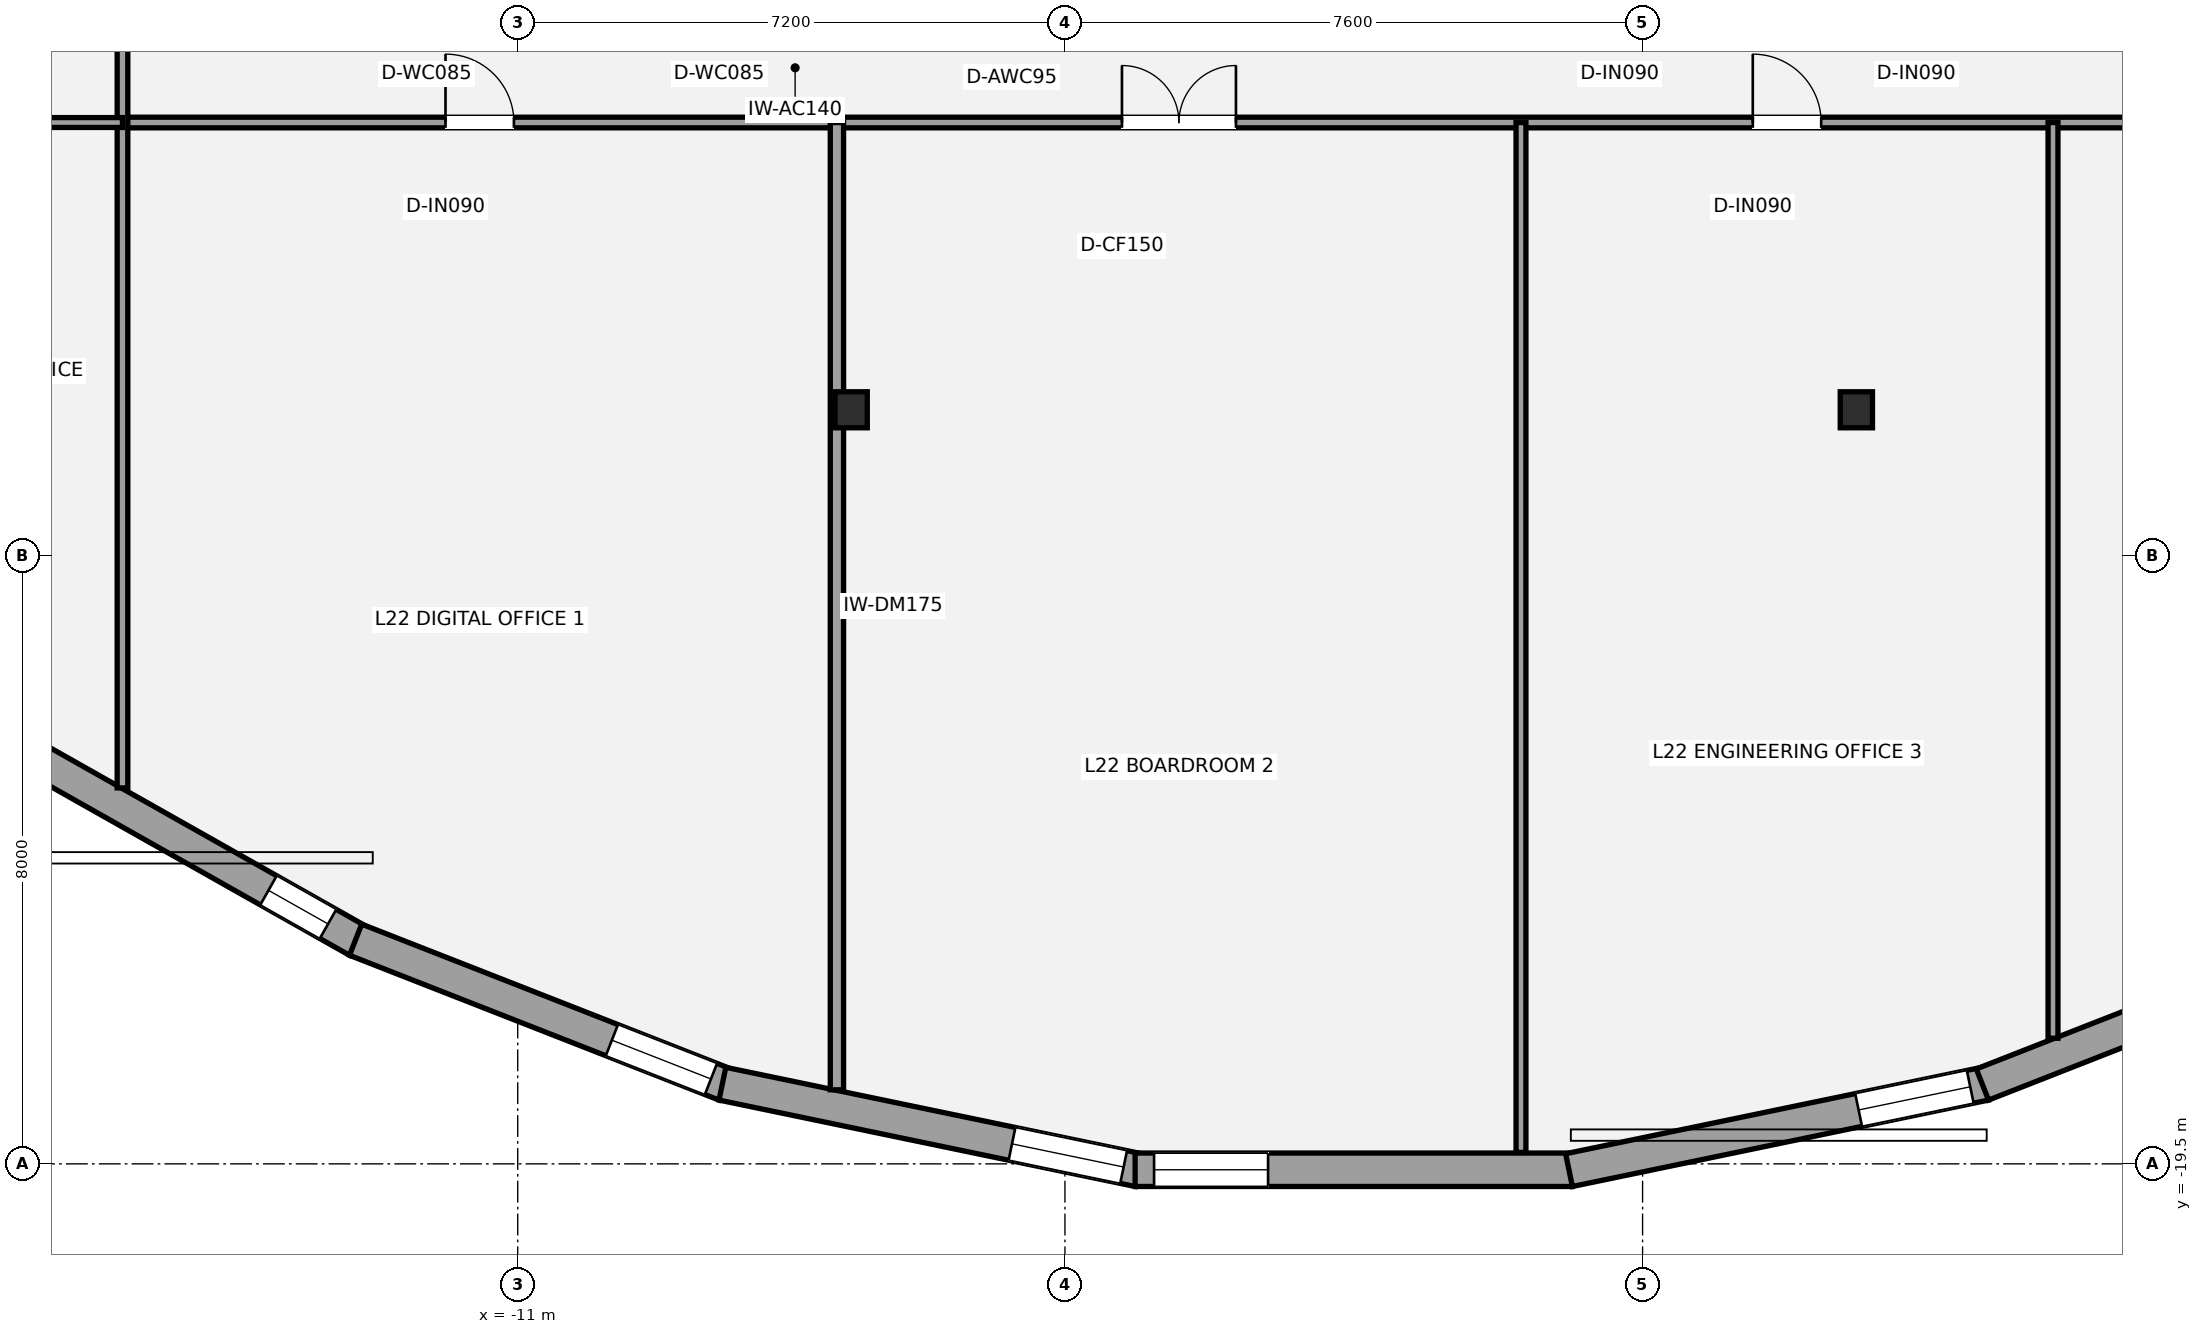
"""IFC4 building model, lengths in metres.
Left out: names, types, materials, properties, quantities, classifications, styles, units other than length and angle.
Written with IfcOpenShell. Run it as: python <this file> out.ifc"""

import sys

from ifc_helpers import new_model, si_unit, direction, frame, frame_2d, origin, origin_2d, place, context, subcontext, project, spatial, rectangle, i_section, extrude, element, fill, save


model = new_model("IFC4")
c1 = context("Model", 3, precision=1e-05, world=origin(), true_north=direction((0.0, 1.0)))
c2 = subcontext(c1, "Body", "Model", "MODEL_VIEW")
j1 = project(units=[si_unit("LENGTHUNIT", "METRE"), si_unit("PLANEANGLEUNIT", "RADIAN")], contexts=[c1])
p1 = place(None, origin())
s1 = spatial("IfcSite", under=j1, at=p1, CompositionType="ELEMENT")
p2 = place(p1, origin())
s2 = spatial("IfcBuilding", under=s1, at=p2, CompositionType="ELEMENT")
p3 = place(p2, frame((0.0, 0.0, 86.1)))
s3 = spatial("IfcBuildingStorey", under=s2, at=p3, CompositionType="ELEMENT", Elevation=86.1)
for number, where, z_axis, x_axis in (
    (1, (-6.613, -9.579, 0.0), (0.0, 0.0, 1.0), (1.0, 0.0, 0.0)),
    (2, (6.613, -9.579, 0.0), (0.0, 0.0, 1.0), (1.0, 0.0, 0.0)),
):
    element("IfcColumn", number, at=place(p3, frame(where, z_axis=z_axis, x_axis=x_axis)), inside=s3, PredefinedType="COLUMN", context=c2, shape_type="SweptSolid", body=[
        extrude(i_section(OverallWidth=0.424, OverallDepth=0.474, WebThickness=0.048, FlangeThickness=0.077, at=origin_2d()), origin(), (0.0, 0.0, 1.0), 3.5),
    ])
p4 = place(p3, frame((-13.105, -16.564, 0.0), z_axis=(0.0, 0.0, 1.0), x_axis=(-0.870732411856, 0.491757121903, 0.0)))
e3 = element("IfcWall", 3, at=p4, inside=s3, PredefinedType="STANDARD", context=c2, shape_type="SweptSolid", body=[
    extrude(rectangle(XDim=4.825, YDim=0.44, at=frame_2d((2.413, 0.0))), origin(), (0.0, 0.0, 1.0), 2.528),
])
p5 = place(p4, frame((0.448, 0.0, 0.58)))
e4 = element("IfcOpeningElement", 4, at=p5, cuts=e3, PredefinedType="OPENING", context=c2, shape_type="SweptSolid", body=[
    extrude(rectangle(XDim=0.9, YDim=1.35, at=frame_2d((0.45, 0.675))), frame((0.0, 0.23, 0.0), z_axis=(0.0, -1.0, 0.0), x_axis=(1.0, 0.0, 0.0)), (0.0, 0.0, 1.0), 0.46),
])
p6 = place(p3, frame((-8.271, -18.456, 0.0), z_axis=(0.0, 0.0, 1.0), x_axis=(-0.931059171354, 0.364868222017, 0.0)))
e5 = element("IfcWall", 5, at=p6, inside=s3, PredefinedType="STANDARD", context=c2, shape_type="SweptSolid", body=[
    extrude(rectangle(XDim=5.222, YDim=0.44, at=frame_2d((2.611, 0.0))), origin(), (0.0, 0.0, 1.0), 2.528),
])
p7 = place(p6, frame((0.2, 0.0, 0.58)))
e6 = element("IfcOpeningElement", 6, at=p7, cuts=e5, PredefinedType="OPENING", context=c2, shape_type="SweptSolid", body=[
    extrude(rectangle(XDim=1.4, YDim=1.55, at=frame_2d((0.7, 0.775))), frame((0.0, 0.23, 0.0), z_axis=(0.0, -1.0, 0.0), x_axis=(1.0, 0.0, 0.0)), (0.0, 0.0, 1.0), 0.46),
])
p8 = place(p3, frame((-2.832, -19.582, 0.0), z_axis=(0.0, 0.0, 1.0), x_axis=(-0.979118590293, 0.20328990664, 0.0)))
e7 = element("IfcWall", 7, at=p8, inside=s3, PredefinedType="STANDARD", context=c2, shape_type="SweptSolid", body=[
    extrude(rectangle(XDim=5.592, YDim=0.44, at=frame_2d((2.796, 0.0))), origin(), (0.0, 0.0, 1.0), 2.528),
])
p9 = place(p8, frame((0.2, 0.0, 0.65)))
e8 = element("IfcOpeningElement", 8, at=p9, cuts=e7, PredefinedType="OPENING", context=c2, shape_type="SweptSolid", body=[
    extrude(rectangle(XDim=1.5, YDim=1.7, at=frame_2d((0.75, 0.85))), frame((0.0, 0.23, 0.0), z_axis=(0.0, -1.0, 0.0), x_axis=(1.0, 0.0, 0.0)), (0.0, 0.0, 1.0), 0.46),
])
p10 = place(p3, frame((2.877, -19.578, 0.0), z_axis=(0.0, 0.0, 1.0), x_axis=(-1.0, 0.0, 0.0)))
e9 = element("IfcWall", 9, at=p10, inside=s3, PredefinedType="STANDARD", context=c2, shape_type="SweptSolid", body=[
    extrude(rectangle(XDim=5.753, YDim=0.44, at=frame_2d((2.877, 0.0))), origin(), (0.0, 0.0, 1.0), 2.528),
])
p11 = place(p10, frame((4.004, 0.0, 0.65)))
e10 = element("IfcOpeningElement", 10, at=p11, cuts=e9, PredefinedType="OPENING", context=c2, shape_type="SweptSolid", body=[
    extrude(rectangle(XDim=1.5, YDim=1.7, at=frame_2d((0.75, 0.85))), frame((0.0, 0.23, 0.0), z_axis=(0.0, -1.0, 0.0), x_axis=(1.0, 0.0, 0.0)), (0.0, 0.0, 1.0), 0.46),
])
p12 = place(p3, frame((8.307, -18.446, 0.0), z_axis=(0.0, 0.0, 1.0), x_axis=(-0.979118590293, -0.20328990664, 0.0)))
e11 = element("IfcWall", 11, at=p12, inside=s3, PredefinedType="STANDARD", context=c2, shape_type="SweptSolid", body=[
    extrude(rectangle(XDim=5.592, YDim=0.44, at=frame_2d((2.796, 0.0))), origin(), (0.0, 0.0, 1.0), 2.528),
])
p13 = place(p12, frame((0.2, 0.0, 0.65)))
e12 = element("IfcOpeningElement", 12, at=p13, cuts=e11, PredefinedType="OPENING", context=c2, shape_type="SweptSolid", body=[
    extrude(rectangle(XDim=1.5, YDim=1.7, at=frame_2d((0.75, 0.85))), frame((0.0, 0.23, 0.0), z_axis=(0.0, -1.0, 0.0), x_axis=(1.0, 0.0, 0.0)), (0.0, 0.0, 1.0), 0.46),
])
p14 = place(p3, frame((13.133, -16.551, 0.0), z_axis=(0.0, 0.0, 1.0), x_axis=(-0.931059171354, -0.364868222017, 0.0)))
e13 = element("IfcWall", 13, at=p14, inside=s3, PredefinedType="STANDARD", context=c2, shape_type="SweptSolid", body=[
    extrude(rectangle(XDim=5.222, YDim=0.44, at=frame_2d((2.611, 0.0))), origin(), (0.0, 0.0, 1.0), 2.528),
])
p15 = place(p14, frame((0.25, 0.0, 0.58)))
e14 = element("IfcOpeningElement", 14, at=p15, cuts=e13, PredefinedType="OPENING", context=c2, shape_type="SweptSolid", body=[
    extrude(rectangle(XDim=1.4, YDim=1.55, at=frame_2d((0.7, 0.775))), frame((0.0, 0.23, 0.0), z_axis=(0.0, -1.0, 0.0), x_axis=(1.0, 0.0, 0.0)), (0.0, 0.0, 1.0), 0.46),
])
p16 = place(p3, frame((-16.2, -5.8, 0.0), z_axis=(0.0, 0.0, 1.0), x_axis=(1.0, 0.0, 0.0)))
e15 = element("IfcWall", 15, at=p16, inside=s3, PredefinedType="PARTITIONING", context=c2, shape_type="SweptSolid", body=[
    extrude(rectangle(XDim=32.4, YDim=0.14, at=frame_2d((16.2, 0.0))), origin(), (0.0, 0.0, 1.0), 2.763),
])
p17 = place(p16, frame((4.25, 0.0, 0.0)))
e16 = element("IfcOpeningElement", 16, at=p17, cuts=e15, PredefinedType="OPENING", context=c2, shape_type="SweptSolid", body=[
    extrude(rectangle(XDim=0.9, YDim=2.1, at=frame_2d((0.45, 1.05))), frame((0.0, 0.08, 0.0), z_axis=(0.0, -1.0, 0.0), x_axis=(1.0, 0.0, 0.0)), (0.0, 0.0, 1.0), 0.16),
])
p18 = place(p16, frame((13.15, 0.0, 0.0)))
e17 = element("IfcOpeningElement", 17, at=p18, cuts=e15, PredefinedType="OPENING", context=c2, shape_type="SweptSolid", body=[
    extrude(rectangle(XDim=1.5, YDim=2.15, at=frame_2d((0.75, 1.075))), frame((0.0, 0.08, 0.0), z_axis=(0.0, -1.0, 0.0), x_axis=(1.0, 0.0, 0.0)), (0.0, 0.0, 1.0), 0.16),
])
p19 = place(p16, frame((21.45, 0.0, 0.0)))
e18 = element("IfcOpeningElement", 18, at=p19, cuts=e15, PredefinedType="OPENING", context=c2, shape_type="SweptSolid", body=[
    extrude(rectangle(XDim=0.9, YDim=2.1, at=frame_2d((0.45, 1.05))), frame((0.0, 0.08, 0.0), z_axis=(0.0, -1.0, 0.0), x_axis=(1.0, 0.0, 0.0)), (0.0, 0.0, 1.0), 0.16),
])
p20 = place(p16, frame((28.15, 0.0, 0.0)))
e19 = element("IfcOpeningElement", 19, at=p20, cuts=e15, PredefinedType="OPENING", context=c2, shape_type="SweptSolid", body=[
    extrude(rectangle(XDim=1.5, YDim=2.15, at=frame_2d((0.75, 1.075))), frame((0.0, 0.08, 0.0), z_axis=(0.0, -1.0, 0.0), x_axis=(1.0, 0.0, 0.0)), (0.0, 0.0, 1.0), 0.16),
])
p21 = place(p3, frame((-16.2, -14.554, 0.0), z_axis=(0.0, 0.0, 1.0), x_axis=(0.0, 1.0, 0.0)))
e20 = element("IfcWall", 20, at=p21, inside=s3, PredefinedType="PARTITIONING", context=c2, shape_type="SweptSolid", body=[
    extrude(rectangle(XDim=22.104, YDim=0.14, at=frame_2d((11.052, 0.0))), origin(), (0.0, 0.0, 1.0), 2.751),
])
p22 = place(p21, frame((12.204, 0.0, 0.0)))
e21 = element("IfcOpeningElement", 21, at=p22, cuts=e20, PredefinedType="OPENING", context=c2, shape_type="SweptSolid", body=[
    extrude(rectangle(XDim=0.9, YDim=2.1, at=frame_2d((0.45, 1.05))), frame((0.0, 0.08, 0.0), z_axis=(0.0, -1.0, 0.0), x_axis=(1.0, 0.0, 0.0)), (0.0, 0.0, 1.0), 0.16),
])
p23 = place(p21, frame((18.879, 0.0, 0.0)))
e22 = element("IfcOpeningElement", 22, at=p23, cuts=e20, PredefinedType="OPENING", context=c2, shape_type="SweptSolid", body=[
    extrude(rectangle(XDim=0.9, YDim=2.1, at=frame_2d((0.45, 1.05))), frame((0.0, 0.08, 0.0), z_axis=(0.0, -1.0, 0.0), x_axis=(1.0, 0.0, 0.0)), (0.0, 0.0, 1.0), 0.16),
])
p24 = place(p3, frame((-6.8, -18.526, 0.0), z_axis=(0.0, 0.0, 1.0), x_axis=(0.0, 1.0, 0.0)))
e23 = element("IfcWall", 23, at=p24, inside=s3, PredefinedType="PARTITIONING", context=c2, shape_type="SweptSolid", body=[
    extrude(rectangle(XDim=12.726, YDim=0.175, at=frame_2d((6.363, 0.0))), origin(), (0.0, 0.0, 1.0), 2.751),
])
p25 = place(p3, frame((2.2, -19.35, 0.0), z_axis=(0.0, 0.0, 1.0), x_axis=(0.0, 1.0, 0.0)))
e24 = element("IfcWall", 24, at=p25, inside=s3, PredefinedType="PARTITIONING", context=c2, shape_type="SweptSolid", body=[
    extrude(rectangle(XDim=13.55, YDim=0.13, at=frame_2d((6.775, 0.0))), origin(), (0.0, 0.0, 1.0), 2.763),
])
p26 = place(p3, frame((9.2, -17.847, 0.0), z_axis=(0.0, 0.0, 1.0), x_axis=(0.0, 1.0, 0.0)))
e25 = element("IfcWall", 25, at=p26, inside=s3, PredefinedType="PARTITIONING", context=c2, shape_type="SweptSolid", body=[
    extrude(rectangle(XDim=12.047, YDim=0.13, at=frame_2d((6.024, 0.0))), origin(), (0.0, 0.0, 1.0), 3.31),
])
p27 = place(p3, frame((-26.823, -5.8, 0.0), z_axis=(0.0, 0.0, 1.0), x_axis=(1.0, 0.0, 0.0)))
e26 = element("IfcWall", 26, at=p27, inside=s3, PredefinedType="PARTITIONING", context=c2, shape_type="SweptSolid", body=[
    extrude(rectangle(XDim=10.624, YDim=0.13, at=frame_2d((5.312, 0.0))), origin(), (0.0, 0.0, 1.0), 2.688),
])
p28 = place(p27, frame((1.23, 0.0, 0.0)))
e27 = element("IfcOpeningElement", 27, at=p28, cuts=e26, PredefinedType="OPENING", context=c2, shape_type="SweptSolid", body=[
    extrude(rectangle(XDim=0.9, YDim=2.1, at=frame_2d((0.45, 1.05))), frame((0.0, 0.075, 0.0), z_axis=(0.0, -1.0, 0.0), x_axis=(1.0, 0.0, 0.0)), (0.0, 0.0, 1.0), 0.15),
])
p29 = place(p5, origin())
e28 = element("IfcWindow", 28, at=p29, inside=s3, PartitioningType="SINGLE_PANEL", PredefinedType="WINDOW", context=c2, shape_type="SweptSolid", body=[
    extrude(rectangle(XDim=0.9, YDim=1.35, at=frame_2d((0.45, 0.675))), frame((0.0, -0.01, 0.0), z_axis=(0.0, -1.0, 0.0), x_axis=(1.0, 0.0, 0.0)), (0.0, 0.0, 1.0), 0.06),
])
fill(e4, e28)
p30 = place(p7, origin())
e29 = element("IfcWindow", 29, at=p30, inside=s3, PartitioningType="SINGLE_PANEL", PredefinedType="WINDOW", context=c2, shape_type="SweptSolid", body=[
    extrude(rectangle(XDim=1.4, YDim=1.55, at=frame_2d((0.7, 0.775))), frame((0.0, -0.01, 0.0), z_axis=(0.0, -1.0, 0.0), x_axis=(1.0, 0.0, 0.0)), (0.0, 0.0, 1.0), 0.06),
])
fill(e6, e29)
p31 = place(p9, origin())
e30 = element("IfcWindow", 30, at=p31, inside=s3, PartitioningType="SINGLE_PANEL", PredefinedType="WINDOW", context=c2, shape_type="SweptSolid", body=[
    extrude(rectangle(XDim=1.5, YDim=1.7, at=frame_2d((0.75, 0.85))), frame((0.0, -0.01, 0.0), z_axis=(0.0, -1.0, 0.0), x_axis=(1.0, 0.0, 0.0)), (0.0, 0.0, 1.0), 0.06),
])
fill(e8, e30)
p32 = place(p11, origin())
e31 = element("IfcWindow", 31, at=p32, inside=s3, PartitioningType="SINGLE_PANEL", PredefinedType="WINDOW", context=c2, shape_type="SweptSolid", body=[
    extrude(rectangle(XDim=1.5, YDim=1.7, at=frame_2d((0.75, 0.85))), frame((0.0, -0.01, 0.0), z_axis=(0.0, -1.0, 0.0), x_axis=(1.0, 0.0, 0.0)), (0.0, 0.0, 1.0), 0.06),
])
fill(e10, e31)
p33 = place(p13, origin())
e32 = element("IfcWindow", 32, at=p33, inside=s3, PartitioningType="SINGLE_PANEL", PredefinedType="WINDOW", context=c2, shape_type="SweptSolid", body=[
    extrude(rectangle(XDim=1.5, YDim=1.7, at=frame_2d((0.75, 0.85))), frame((0.0, -0.01, 0.0), z_axis=(0.0, -1.0, 0.0), x_axis=(1.0, 0.0, 0.0)), (0.0, 0.0, 1.0), 0.06),
])
fill(e12, e32)
p34 = place(p17, origin())
e33 = element("IfcDoor", 33, at=p34, inside=s3, OperationType="SINGLE_SWING_LEFT", PredefinedType="DOOR", context=c2, shape_type="SweptSolid", body=[
    extrude(rectangle(XDim=0.9, YDim=2.1, at=frame_2d((0.45, 1.05))), frame((0.0, 0.025, 0.0), z_axis=(0.0, -1.0, 0.0), x_axis=(1.0, 0.0, 0.0)), (0.0, 0.0, 1.0), 0.05),
])
fill(e16, e33)
p35 = place(p18, origin())
e34 = element("IfcDoor", 34, at=p35, inside=s3, OperationType="DOUBLE_DOOR_SINGLE_SWING", PredefinedType="DOOR", context=c2, shape_type="SweptSolid", body=[
    extrude(rectangle(XDim=1.5, YDim=2.15, at=frame_2d((0.75, 1.075))), frame((0.0, 0.025, 0.0), z_axis=(0.0, -1.0, 0.0), x_axis=(1.0, 0.0, 0.0)), (0.0, 0.0, 1.0), 0.05),
])
fill(e17, e34)
p36 = place(p19, origin())
e35 = element("IfcDoor", 35, at=p36, inside=s3, OperationType="SINGLE_SWING_LEFT", PredefinedType="DOOR", context=c2, shape_type="SweptSolid", body=[
    extrude(rectangle(XDim=0.9, YDim=2.1, at=frame_2d((0.45, 1.05))), frame((0.0, 0.025, 0.0), z_axis=(0.0, -1.0, 0.0), x_axis=(1.0, 0.0, 0.0)), (0.0, 0.0, 1.0), 0.05),
])
fill(e18, e35)
save(model, sys.argv[1])
